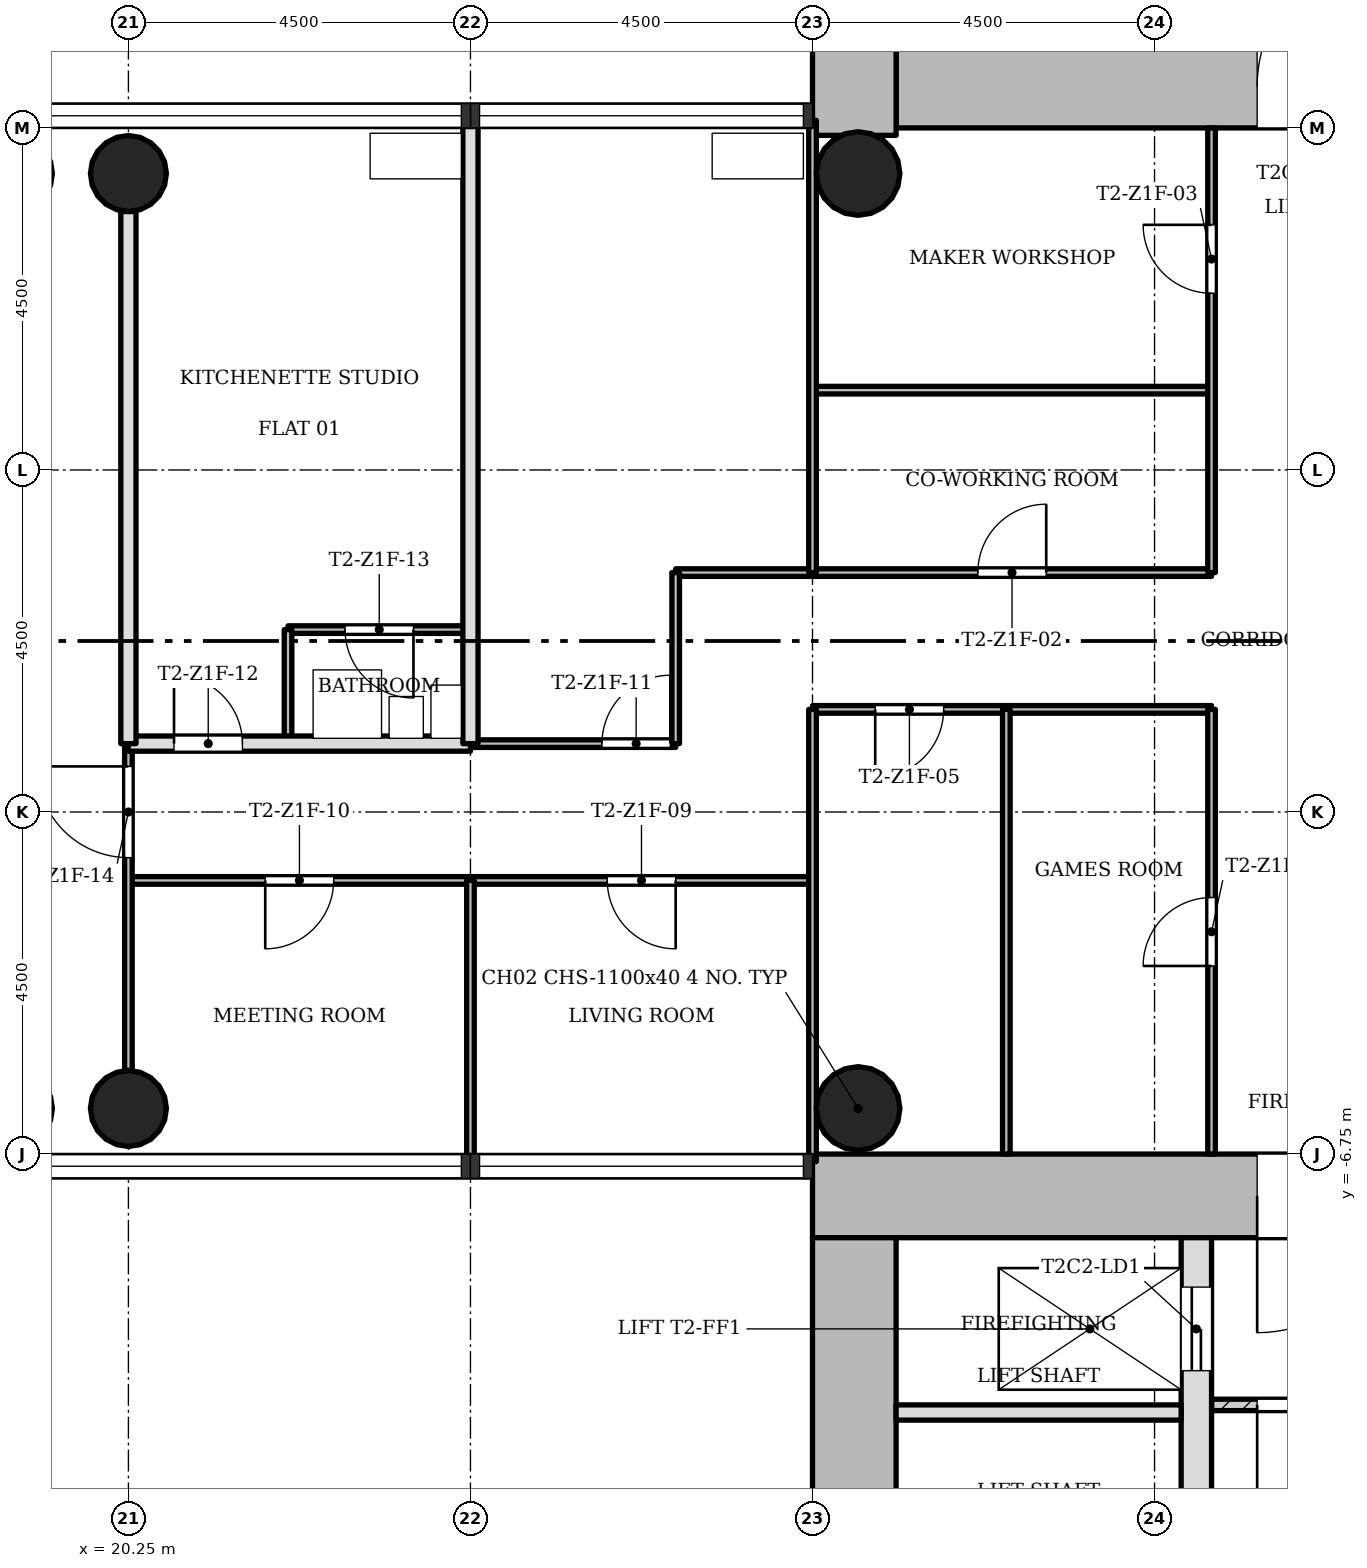
"""IFC4 building model, lengths in metres.
Left out: names, types, materials, properties, quantities, classifications, styles, units other than length and angle.
Written with IfcOpenShell. Run it as: python <this file> out.ifc"""

import sys

from ifc_helpers import new_model, si_unit, direction, frame, frame_2d, origin, origin_2d, place, context, subcontext, project, spatial, rectangle, hollow_circle, extrude, element, fill, save


model = new_model("IFC4")
c1 = context("Model", 3, precision=1e-05, world=origin(), true_north=direction((0.0, 1.0)))
c2 = subcontext(c1, "Body", "Model", "MODEL_VIEW")
j1 = project(units=[si_unit("LENGTHUNIT", "METRE"), si_unit("PLANEANGLEUNIT", "RADIAN")], contexts=[c1])
p1 = place(None, origin())
s1 = spatial("IfcSite", under=j1, at=p1, CompositionType="ELEMENT")
p2 = place(p1, origin())
s2 = spatial("IfcBuilding", under=s1, at=p2, CompositionType="ELEMENT")
p3 = place(p2, frame((0.0, 0.0, 68.7)))
s3 = spatial("IfcBuildingStorey", under=s2, at=p3, CompositionType="ELEMENT", Elevation=68.7)
p4 = place(p3, frame((30.35, 7.3, 0.0), z_axis=(0.0, 0.0, 1.0), x_axis=(1.0, 0.0, 0.0)))
e1 = element("IfcWall", 1, at=p4, inside=s3, PredefinedType="SHEAR", context=c2, shape_type="SweptSolid", body=[
    extrude(rectangle(XDim=12.4, YDim=1.1, at=frame_2d((6.2, 0.0))), origin(), (0.0, 0.0, 1.0), 3.4),
])
p5 = place(p4, frame((4.75, 0.0, 0.0)))
e2 = element("IfcOpeningElement", 2, at=p5, cuts=e1, PredefinedType="OPENING", context=c2, shape_type="SweptSolid", body=[
    extrude(rectangle(XDim=1.8, YDim=2.1, at=frame_2d((0.9, 1.05))), frame((0.0, 0.56, 0.0), z_axis=(0.0, -1.0, 0.0), x_axis=(1.0, 0.0, 0.0)), (0.0, 0.0, 1.0), 1.12),
])
p6 = place(p3, frame((29.8, 15.248, 0.0), z_axis=(0.0, 0.0, 1.0), x_axis=(0.0, -1.0, 0.0)))
e3 = element("IfcWall", 3, at=p6, inside=s3, PredefinedType="SHEAR", context=c2, shape_type="SweptSolid", body=[
    extrude(rectangle(XDim=8.596, YDim=1.1, at=frame_2d((4.298, 0.0))), origin(), (0.0, 0.0, 1.0), 3.4),
])
p7 = place(p3, frame((41.65, -7.3, 0.0), z_axis=(0.0, 0.0, 1.0), x_axis=(-1.0, 0.0, 0.0)))
e4 = element("IfcWall", 4, at=p7, inside=s3, PredefinedType="SHEAR", context=c2, shape_type="SweptSolid", body=[
    extrude(rectangle(XDim=12.4, YDim=1.1, at=frame_2d((6.2, 0.0))), origin(), (0.0, 0.0, 1.0), 3.4),
])
p8 = place(p7, frame((4.75, 0.0, 0.0)))
e5 = element("IfcOpeningElement", 5, at=p8, cuts=e4, PredefinedType="OPENING", context=c2, shape_type="SweptSolid", body=[
    extrude(rectangle(XDim=1.8, YDim=2.1, at=frame_2d((0.9, 1.05))), frame((0.0, 0.56, 0.0), z_axis=(0.0, -1.0, 0.0), x_axis=(1.0, 0.0, 0.0)), (0.0, 0.0, 1.0), 1.12),
])
p9 = place(p3, frame((29.8, -7.85, 0.0), z_axis=(0.0, 0.0, 1.0), x_axis=(0.0, -1.0, 0.0)))
e6 = element("IfcWall", 6, at=p9, inside=s3, PredefinedType="SHEAR", context=c2, shape_type="SweptSolid", body=[
    extrude(rectangle(XDim=7.9, YDim=1.1, at=frame_2d((3.95, 0.0))), origin(), (0.0, 0.0, 1.0), 3.4),
])
p10 = place(p3, frame((34.3, -14.65, 0.0), z_axis=(0.0, 0.0, 1.0), x_axis=(0.0, 1.0, 0.0)))
e7 = element("IfcWall", 7, at=p10, inside=s3, PredefinedType="SHEAR", context=c2, shape_type="SweptSolid", body=[
    extrude(rectangle(XDim=6.8, YDim=0.4, at=frame_2d((3.4, 0.0))), origin(), (0.0, 0.0, 1.0), 3.4),
])
p11 = place(p10, frame((5.05, 0.0, 0.0)))
e8 = element("IfcOpeningElement", 8, at=p11, cuts=e7, PredefinedType="OPENING", context=c2, shape_type="SweptSolid", body=[
    extrude(rectangle(XDim=1.1, YDim=2.1, at=frame_2d((0.55, 1.05))), frame((0.0, 0.21, 0.0), z_axis=(0.0, -1.0, 0.0), x_axis=(1.0, 0.0, 0.0)), (0.0, 0.0, 1.0), 0.42),
])
for number, where, z_axis, x_axis in (
    (9, (20.25, 6.15, 0.0), (0.0, 0.0, 1.0), (1.0, 0.0, 0.0)),
    (10, (20.25, -6.15, 0.0), (0.0, 0.0, 1.0), (1.0, 0.0, 0.0)),
):
    element("IfcColumn", number, at=place(p3, frame(where, z_axis=z_axis, x_axis=x_axis)), inside=s3, PredefinedType="COLUMN", context=c2, shape_type="SweptSolid", body=[
        extrude(hollow_circle(Radius=0.5, WallThickness=0.036, at=origin_2d()), origin(), (0.0, 0.0, 1.0), 3.4),
    ])
for number, where, z_axis, x_axis in (
    (11, (29.85, 6.15, 0.0), (0.0, 0.0, 1.0), (1.0, 0.0, 0.0)),
    (12, (29.85, -6.15, 0.0), (0.0, 0.0, 1.0), (1.0, 0.0, 0.0)),
):
    element("IfcColumn", number, at=place(p3, frame(where, z_axis=z_axis, x_axis=x_axis)), inside=s3, PredefinedType="COLUMN", context=c2, shape_type="SweptSolid", body=[
        extrude(hollow_circle(Radius=0.55, WallThickness=0.04, at=origin_2d()), origin(), (0.0, 0.0, 1.0), 3.4),
    ])
p12 = place(p3, frame((34.5, -10.05, 0.0), z_axis=(0.0, 0.0, 1.0), x_axis=(1.0, 0.0, 0.0)))
e13 = element("IfcWall", 13, at=p12, inside=s3, PredefinedType="PARTITIONING", context=c2, shape_type="SweptSolid", body=[
    extrude(rectangle(XDim=3.0, YDim=0.15, at=frame_2d((1.5, 0.0))), origin(), (0.0, 0.0, 1.0), 3.0),
])
p13 = place(p12, frame((0.6, 0.0, 0.0)))
e14 = element("IfcOpeningElement", 14, at=p13, cuts=e13, PredefinedType="OPENING", context=c2, shape_type="SweptSolid", body=[
    extrude(rectangle(XDim=1.8, YDim=2.1, at=frame_2d((0.9, 1.05))), frame((0.0, 0.085, 0.0), z_axis=(0.0, -1.0, 0.0), x_axis=(1.0, 0.0, 0.0)), (0.0, 0.0, 1.0), 0.17),
])
p14 = place(p3, frame((30.35, -10.15, 0.0), z_axis=(0.0, 0.0, 1.0), x_axis=(1.0, 0.0, 0.0)))
e15 = element("IfcWall", 15, at=p14, inside=s3, PredefinedType="SOLIDWALL", context=c2, shape_type="SweptSolid", body=[
    extrude(rectangle(XDim=3.75, YDim=0.2, at=frame_2d((1.875, 0.0))), origin(), (0.0, 0.0, 1.0), 3.0),
])
p15 = place(p3, frame((29.25, -3.15, 0.0), z_axis=(0.0, 0.0, 1.0), x_axis=(-1.0, 0.0, 0.0)))
e16 = element("IfcWall", 16, at=p15, inside=s3, PredefinedType="PARTITIONING", context=c2, shape_type="SweptSolid", body=[
    extrude(rectangle(XDim=9.0, YDim=0.1, at=frame_2d((4.5, 0.0))), origin(), (0.0, 0.0, 1.0), 3.0),
])
p16 = place(p15, frame((1.8, 0.0, 0.0)))
e17 = element("IfcOpeningElement", 17, at=p16, cuts=e16, PredefinedType="OPENING", context=c2, shape_type="SweptSolid", body=[
    extrude(rectangle(XDim=0.9, YDim=2.1, at=frame_2d((0.45, 1.05))), frame((0.0, 0.06, 0.0), z_axis=(0.0, -1.0, 0.0), x_axis=(1.0, 0.0, 0.0)), (0.0, 0.0, 1.0), 0.12),
])
p17 = place(p15, frame((6.3, 0.0, 0.0)))
e18 = element("IfcOpeningElement", 18, at=p17, cuts=e16, PredefinedType="OPENING", context=c2, shape_type="SweptSolid", body=[
    extrude(rectangle(XDim=0.9, YDim=2.1, at=frame_2d((0.45, 1.05))), frame((0.0, 0.06, 0.0), z_axis=(0.0, -1.0, 0.0), x_axis=(1.0, 0.0, 0.0)), (0.0, 0.0, 1.0), 0.12),
])
p18 = place(p3, frame((27.45, -1.35, 0.0), z_axis=(0.0, 0.0, 1.0), x_axis=(-1.0, 0.0, 0.0)))
e19 = element("IfcWall", 19, at=p18, inside=s3, PredefinedType="PARTITIONING", context=c2, shape_type="SweptSolid", body=[
    extrude(rectangle(XDim=2.7, YDim=0.1, at=frame_2d((1.35, 0.0))), origin(), (0.0, 0.0, 1.0), 3.0),
])
p19 = place(p18, frame((0.07, 0.0, 0.0)))
e20 = element("IfcOpeningElement", 20, at=p19, cuts=e19, PredefinedType="OPENING", context=c2, shape_type="SweptSolid", body=[
    extrude(rectangle(XDim=0.9, YDim=2.1, at=frame_2d((0.45, 1.05))), frame((0.0, 0.06, 0.0), z_axis=(0.0, -1.0, 0.0), x_axis=(1.0, 0.0, 0.0)), (0.0, 0.0, 1.0), 0.12),
])
p20 = place(p3, frame((24.75, -1.35, 0.0), z_axis=(0.0, 0.0, 1.0), x_axis=(-1.0, 0.0, 0.0)))
e21 = element("IfcWall", 21, at=p20, inside=s3, PredefinedType="SOLIDWALL", context=c2, shape_type="SweptSolid", body=[
    extrude(rectangle(XDim=4.5, YDim=0.2, at=frame_2d((2.25, 0.0))), origin(), (0.0, 0.0, 1.0), 3.0),
])
p21 = place(p20, frame((3.0, 0.0, 0.0)))
e22 = element("IfcOpeningElement", 22, at=p21, cuts=e21, PredefinedType="OPENING", context=c2, shape_type="SweptSolid", body=[
    extrude(rectangle(XDim=0.9, YDim=2.1, at=frame_2d((0.45, 1.05))), frame((0.0, 0.11, 0.0), z_axis=(0.0, -1.0, 0.0), x_axis=(1.0, 0.0, 0.0)), (0.0, 0.0, 1.0), 0.22),
])
p22 = place(p3, frame((34.5, -0.9, 0.0), z_axis=(0.0, 0.0, 1.0), x_axis=(-1.0, 0.0, 0.0)))
e23 = element("IfcWall", 23, at=p22, inside=s3, PredefinedType="PARTITIONING", context=c2, shape_type="SweptSolid", body=[
    extrude(rectangle(XDim=5.25, YDim=0.1, at=frame_2d((2.625, 0.0))), origin(), (0.0, 0.0, 1.0), 3.0),
])
p23 = place(p22, frame((3.525, 0.0, 0.0)))
e24 = element("IfcOpeningElement", 24, at=p23, cuts=e23, PredefinedType="OPENING", context=c2, shape_type="SweptSolid", body=[
    extrude(rectangle(XDim=0.9, YDim=2.1, at=frame_2d((0.45, 1.05))), frame((0.0, 0.06, 0.0), z_axis=(0.0, -1.0, 0.0), x_axis=(1.0, 0.0, 0.0)), (0.0, 0.0, 1.0), 0.12),
])
p24 = place(p3, frame((24.75, 0.15, 0.0), z_axis=(0.0, 0.0, 1.0), x_axis=(-1.0, 0.0, 0.0)))
e25 = element("IfcWall", 25, at=p24, inside=s3, PredefinedType="PARTITIONING", context=c2, shape_type="SweptSolid", body=[
    extrude(rectangle(XDim=2.4, YDim=0.1, at=frame_2d((1.2, 0.0))), origin(), (0.0, 0.0, 1.0), 3.0),
])
p25 = place(p24, frame((0.75, 0.0, 0.0)))
e26 = element("IfcOpeningElement", 26, at=p25, cuts=e25, PredefinedType="OPENING", context=c2, shape_type="SweptSolid", body=[
    extrude(rectangle(XDim=0.9, YDim=2.1, at=frame_2d((0.45, 1.05))), frame((0.0, 0.06, 0.0), z_axis=(0.0, -1.0, 0.0), x_axis=(1.0, 0.0, 0.0)), (0.0, 0.0, 1.0), 0.12),
])
p26 = place(p3, frame((34.5, 0.9, 0.0), z_axis=(0.0, 0.0, 1.0), x_axis=(-1.0, 0.0, 0.0)))
e27 = element("IfcWall", 27, at=p26, inside=s3, PredefinedType="PARTITIONING", context=c2, shape_type="SweptSolid", body=[
    extrude(rectangle(XDim=7.05, YDim=0.1, at=frame_2d((3.525, 0.0))), origin(), (0.0, 0.0, 1.0), 3.0),
])
p27 = place(p26, frame((2.175, 0.0, 0.0)))
e28 = element("IfcOpeningElement", 28, at=p27, cuts=e27, PredefinedType="OPENING", context=c2, shape_type="SweptSolid", body=[
    extrude(rectangle(XDim=0.9, YDim=2.1, at=frame_2d((0.45, 1.05))), frame((0.0, 0.06, 0.0), z_axis=(0.0, -1.0, 0.0), x_axis=(1.0, 0.0, 0.0)), (0.0, 0.0, 1.0), 0.12),
])
p28 = place(p3, frame((34.5, 3.3, 0.0), z_axis=(0.0, 0.0, 1.0), x_axis=(-1.0, 0.0, 0.0)))
e29 = element("IfcWall", 29, at=p28, inside=s3, PredefinedType="PARTITIONING", context=c2, shape_type="SweptSolid", body=[
    extrude(rectangle(XDim=5.25, YDim=0.1, at=frame_2d((2.625, 0.0))), origin(), (0.0, 0.0, 1.0), 3.0),
])
p29 = place(p3, frame((34.5, -6.75, 0.0), z_axis=(0.0, 0.0, 1.0), x_axis=(0.0, 1.0, 0.0)))
e30 = element("IfcWall", 30, at=p29, inside=s3, PredefinedType="PARTITIONING", context=c2, shape_type="SweptSolid", body=[
    extrude(rectangle(XDim=5.85, YDim=0.1, at=frame_2d((2.925, 0.0))), origin(), (0.0, 0.0, 1.0), 3.0),
])
p30 = place(p29, frame((2.475, 0.0, 0.0)))
e31 = element("IfcOpeningElement", 31, at=p30, cuts=e30, PredefinedType="OPENING", context=c2, shape_type="SweptSolid", body=[
    extrude(rectangle(XDim=0.9, YDim=2.1, at=frame_2d((0.45, 1.05))), frame((0.0, 0.06, 0.0), z_axis=(0.0, -1.0, 0.0), x_axis=(1.0, 0.0, 0.0)), (0.0, 0.0, 1.0), 0.12),
])
p31 = place(p3, frame((34.5, 0.9, 0.0), z_axis=(0.0, 0.0, 1.0), x_axis=(0.0, 1.0, 0.0)))
e32 = element("IfcWall", 32, at=p31, inside=s3, PredefinedType="PARTITIONING", context=c2, shape_type="SweptSolid", body=[
    extrude(rectangle(XDim=5.85, YDim=0.1, at=frame_2d((2.925, 0.0))), origin(), (0.0, 0.0, 1.0), 3.0),
])
p32 = place(p31, frame((3.675, 0.0, 0.0)))
e33 = element("IfcOpeningElement", 33, at=p32, cuts=e32, PredefinedType="OPENING", context=c2, shape_type="SweptSolid", body=[
    extrude(rectangle(XDim=0.9, YDim=2.1, at=frame_2d((0.45, 1.05))), frame((0.0, 0.06, 0.0), z_axis=(0.0, -1.0, 0.0), x_axis=(1.0, 0.0, 0.0)), (0.0, 0.0, 1.0), 0.12),
])
p33 = place(p3, frame((31.8, -6.75, 0.0), z_axis=(0.0, 0.0, 1.0), x_axis=(0.0, 1.0, 0.0)))
e34 = element("IfcWall", 34, at=p33, inside=s3, PredefinedType="PARTITIONING", context=c2, shape_type="SweptSolid", body=[
    extrude(rectangle(XDim=5.85, YDim=0.1, at=frame_2d((2.925, 0.0))), origin(), (0.0, 0.0, 1.0), 3.0),
])
for number, where, z_axis, x_axis in (
    (35, (29.25, -6.85, 0.0), (0.0, 0.0, 1.0), (0.0, 1.0, 0.0)),
    (36, (29.25, 0.9, 0.0), (0.0, 0.0, 1.0), (0.0, 1.0, 0.0)),
):
    element("IfcWall", number, at=place(p3, frame(where, z_axis=z_axis, x_axis=x_axis)), inside=s3, PredefinedType="PARTITIONING", context=c2, shape_type="SweptSolid", body=[
        extrude(rectangle(XDim=5.95, YDim=0.1, at=frame_2d((2.975, 0.0))), origin(), (0.0, 0.0, 1.0), 3.0),
    ])
p34 = place(p3, frame((27.45, -1.35, 0.0), z_axis=(0.0, 0.0, 1.0), x_axis=(0.0, 1.0, 0.0)))
e37 = element("IfcWall", 37, at=p34, inside=s3, PredefinedType="PARTITIONING", context=c2, shape_type="SweptSolid", body=[
    extrude(rectangle(XDim=2.25, YDim=0.1, at=frame_2d((1.125, 0.0))), origin(), (0.0, 0.0, 1.0), 3.0),
])
p35 = place(p3, frame((24.75, -6.85, 0.0), z_axis=(0.0, 0.0, 1.0), x_axis=(0.0, 1.0, 0.0)))
e38 = element("IfcWall", 38, at=p35, inside=s3, PredefinedType="PARTITIONING", context=c2, shape_type="SweptSolid", body=[
    extrude(rectangle(XDim=3.7, YDim=0.1, at=frame_2d((1.85, 0.0))), origin(), (0.0, 0.0, 1.0), 3.0),
])
p36 = place(p3, frame((24.75, -1.35, 0.0), z_axis=(0.0, 0.0, 1.0), x_axis=(0.0, 1.0, 0.0)))
e39 = element("IfcWall", 39, at=p36, inside=s3, PredefinedType="SOLIDWALL", context=c2, shape_type="SweptSolid", body=[
    extrude(rectangle(XDim=8.2, YDim=0.2, at=frame_2d((4.1, 0.0))), origin(), (0.0, 0.0, 1.0), 3.0),
])
p37 = place(p3, frame((22.35, -1.35, 0.0), z_axis=(0.0, 0.0, 1.0), x_axis=(0.0, 1.0, 0.0)))
e40 = element("IfcWall", 40, at=p37, inside=s3, PredefinedType="PARTITIONING", context=c2, shape_type="SweptSolid", body=[
    extrude(rectangle(XDim=1.5, YDim=0.1, at=frame_2d((0.75, 0.0))), origin(), (0.0, 0.0, 1.0), 3.0),
])
p38 = place(p3, frame((20.25, -5.65, 0.0), z_axis=(0.0, 0.0, 1.0), x_axis=(0.0, 1.0, 0.0)))
e41 = element("IfcWall", 41, at=p38, inside=s3, PredefinedType="PARTITIONING", context=c2, shape_type="SweptSolid", body=[
    extrude(rectangle(XDim=4.3, YDim=0.1, at=frame_2d((2.15, 0.0))), origin(), (0.0, 0.0, 1.0), 3.0),
])
p39 = place(p38, frame((2.8, 0.0, 0.0)))
e42 = element("IfcOpeningElement", 42, at=p39, cuts=e41, PredefinedType="OPENING", context=c2, shape_type="SweptSolid", body=[
    extrude(rectangle(XDim=1.2, YDim=2.1, at=frame_2d((0.6, 1.05))), frame((0.0, 0.06, 0.0), z_axis=(0.0, -1.0, 0.0), x_axis=(1.0, 0.0, 0.0)), (0.0, 0.0, 1.0), 0.12),
])
p40 = place(p3, frame((20.25, -1.35, 0.0), z_axis=(0.0, 0.0, 1.0), x_axis=(0.0, 1.0, 0.0)))
e43 = element("IfcWall", 43, at=p40, inside=s3, PredefinedType="SOLIDWALL", context=c2, shape_type="SweptSolid", body=[
    extrude(rectangle(XDim=7.0, YDim=0.2, at=frame_2d((3.5, 0.0))), origin(), (0.0, 0.0, 1.0), 3.0),
])
p41 = place(p13, origin())
e44 = element("IfcDoor", 44, at=p41, inside=s3, OperationType="SINGLE_SWING_LEFT", PredefinedType="DOOR", context=c2, shape_type="SweptSolid", body=[
    extrude(rectangle(XDim=1.8, YDim=2.1, at=frame_2d((0.9, 1.05))), frame((0.0, 0.025, 0.0), z_axis=(0.0, -1.0, 0.0), x_axis=(1.0, 0.0, 0.0)), (0.0, 0.0, 1.0), 0.05),
])
fill(e14, e44)
p42 = place(p27, origin())
e45 = element("IfcDoor", 45, at=p42, inside=s3, OperationType="SINGLE_SWING_LEFT", PredefinedType="DOOR", context=c2, shape_type="SweptSolid", body=[
    extrude(rectangle(XDim=0.9, YDim=2.1, at=frame_2d((0.45, 1.05))), frame((0.0, 0.025, 0.0), z_axis=(0.0, -1.0, 0.0), x_axis=(1.0, 0.0, 0.0)), (0.0, 0.0, 1.0), 0.05),
])
fill(e28, e45)
p43 = place(p32, origin())
e46 = element("IfcDoor", 46, at=p43, inside=s3, OperationType="SINGLE_SWING_LEFT", PredefinedType="DOOR", context=c2, shape_type="SweptSolid", body=[
    extrude(rectangle(XDim=0.9, YDim=2.1, at=frame_2d((0.45, 1.05))), frame((0.0, 0.025, 0.0), z_axis=(0.0, -1.0, 0.0), x_axis=(1.0, 0.0, 0.0)), (0.0, 0.0, 1.0), 0.05),
])
fill(e33, e46)
p44 = place(p30, origin())
e47 = element("IfcDoor", 47, at=p44, inside=s3, OperationType="SINGLE_SWING_RIGHT", PredefinedType="DOOR", context=c2, shape_type="SweptSolid", body=[
    extrude(rectangle(XDim=0.9, YDim=2.1, at=frame_2d((0.45, 1.05))), frame((0.0, 0.025, 0.0), z_axis=(0.0, -1.0, 0.0), x_axis=(1.0, 0.0, 0.0)), (0.0, 0.0, 1.0), 0.05),
])
fill(e31, e47)
p45 = place(p23, origin())
e48 = element("IfcDoor", 48, at=p45, inside=s3, OperationType="SINGLE_SWING_LEFT", PredefinedType="DOOR", context=c2, shape_type="SweptSolid", body=[
    extrude(rectangle(XDim=0.9, YDim=2.1, at=frame_2d((0.45, 1.05))), frame((0.0, 0.025, 0.0), z_axis=(0.0, -1.0, 0.0), x_axis=(1.0, 0.0, 0.0)), (0.0, 0.0, 1.0), 0.05),
])
fill(e24, e48)
p46 = place(p16, origin())
e49 = element("IfcDoor", 49, at=p46, inside=s3, OperationType="SINGLE_SWING_RIGHT", PredefinedType="DOOR", context=c2, shape_type="SweptSolid", body=[
    extrude(rectangle(XDim=0.9, YDim=2.1, at=frame_2d((0.45, 1.05))), frame((0.0, 0.025, 0.0), z_axis=(0.0, -1.0, 0.0), x_axis=(1.0, 0.0, 0.0)), (0.0, 0.0, 1.0), 0.05),
])
fill(e17, e49)
p47 = place(p17, origin())
e50 = element("IfcDoor", 50, at=p47, inside=s3, OperationType="SINGLE_SWING_LEFT", PredefinedType="DOOR", context=c2, shape_type="SweptSolid", body=[
    extrude(rectangle(XDim=0.9, YDim=2.1, at=frame_2d((0.45, 1.05))), frame((0.0, 0.025, 0.0), z_axis=(0.0, -1.0, 0.0), x_axis=(1.0, 0.0, 0.0)), (0.0, 0.0, 1.0), 0.05),
])
fill(e18, e50)
p48 = place(p19, origin())
e51 = element("IfcDoor", 51, at=p48, inside=s3, OperationType="SINGLE_SWING_LEFT", PredefinedType="DOOR", context=c2, shape_type="SweptSolid", body=[
    extrude(rectangle(XDim=0.9, YDim=2.1, at=frame_2d((0.45, 1.05))), frame((0.0, 0.025, 0.0), z_axis=(0.0, -1.0, 0.0), x_axis=(1.0, 0.0, 0.0)), (0.0, 0.0, 1.0), 0.05),
])
fill(e20, e51)
p49 = place(p21, origin())
e52 = element("IfcDoor", 52, at=p49, inside=s3, OperationType="SINGLE_SWING_RIGHT", PredefinedType="DOOR", context=c2, shape_type="SweptSolid", body=[
    extrude(rectangle(XDim=0.9, YDim=2.1, at=frame_2d((0.45, 1.05))), frame((0.0, 0.025, 0.0), z_axis=(0.0, -1.0, 0.0), x_axis=(1.0, 0.0, 0.0)), (0.0, 0.0, 1.0), 0.05),
])
fill(e22, e52)
p50 = place(p25, origin())
e53 = element("IfcDoor", 53, at=p50, inside=s3, OperationType="SINGLE_SWING_RIGHT", PredefinedType="DOOR", context=c2, shape_type="SweptSolid", body=[
    extrude(rectangle(XDim=0.9, YDim=2.1, at=frame_2d((0.45, 1.05))), frame((0.0, 0.025, 0.0), z_axis=(0.0, -1.0, 0.0), x_axis=(1.0, 0.0, 0.0)), (0.0, 0.0, 1.0), 0.05),
])
fill(e26, e53)
p51 = place(p39, origin())
e54 = element("IfcDoor", 54, at=p51, inside=s3, OperationType="SINGLE_SWING_LEFT", PredefinedType="DOOR", context=c2, shape_type="SweptSolid", body=[
    extrude(rectangle(XDim=1.2, YDim=2.1, at=frame_2d((0.6, 1.05))), frame((0.0, 0.025, 0.0), z_axis=(0.0, -1.0, 0.0), x_axis=(1.0, 0.0, 0.0)), (0.0, 0.0, 1.0), 0.05),
])
fill(e42, e54)
p52 = place(p5, origin())
e55 = element("IfcDoor", 55, at=p52, inside=s3, OperationType="SINGLE_SWING_LEFT", PredefinedType="DOOR", context=c2, shape_type="SweptSolid", body=[
    extrude(rectangle(XDim=1.8, YDim=2.1, at=frame_2d((0.9, 1.05))), frame((0.0, 0.025, 0.0), z_axis=(0.0, -1.0, 0.0), x_axis=(1.0, 0.0, 0.0)), (0.0, 0.0, 1.0), 0.05),
])
fill(e2, e55)
p53 = place(p11, origin())
e56 = element("IfcDoor", 56, at=p53, inside=s3, OperationType="SLIDING_TO_LEFT", PredefinedType="DOOR", context=c2, shape_type="SweptSolid", body=[
    extrude(rectangle(XDim=1.1, YDim=2.1, at=frame_2d((0.55, 1.05))), frame((0.0, 0.025, 0.0), z_axis=(0.0, -1.0, 0.0), x_axis=(1.0, 0.0, 0.0)), (0.0, 0.0, 1.0), 0.05),
])
fill(e8, e56)
p54 = place(p8, origin())
e57 = element("IfcDoor", 57, at=p54, inside=s3, OperationType="SINGLE_SWING_LEFT", PredefinedType="DOOR", context=c2, shape_type="SweptSolid", body=[
    extrude(rectangle(XDim=1.8, YDim=2.1, at=frame_2d((0.9, 1.05))), frame((0.0, 0.025, 0.0), z_axis=(0.0, -1.0, 0.0), x_axis=(1.0, 0.0, 0.0)), (0.0, 0.0, 1.0), 0.05),
])
fill(e5, e57)
save(model, sys.argv[1])
